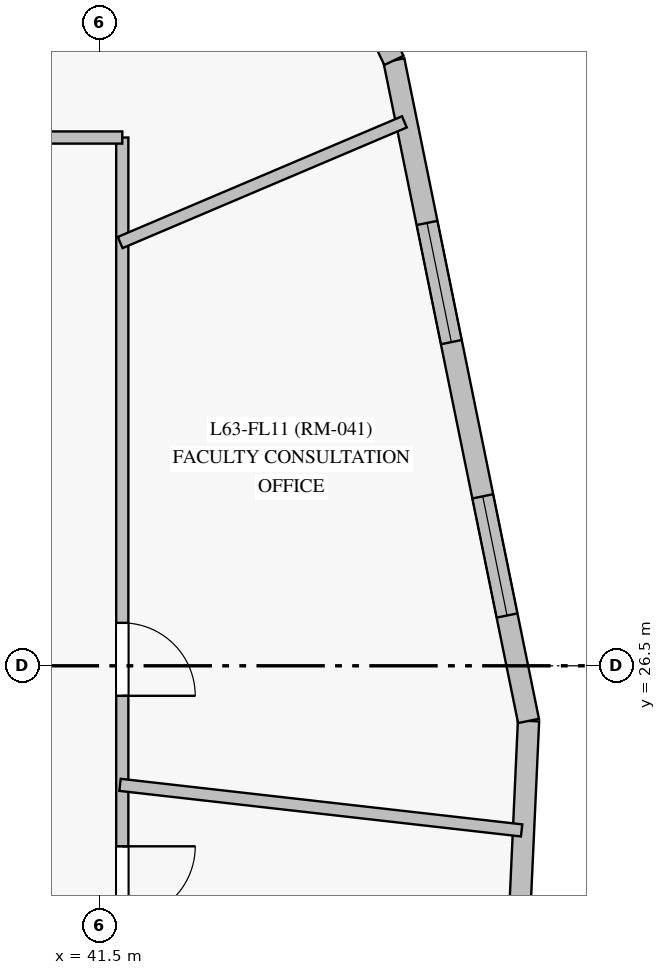
"""IFC4 building model, lengths in metres.
Left out: names, types, materials, properties, quantities, classifications, styles, units other than length and angle.
Written with IfcOpenShell. Run it as: python <this file> out.ifc"""

import sys

from ifc_helpers import new_model, si_unit, direction, frame, frame_2d, origin, origin_with_axes, place, context, subcontext, project, spatial, rectangle, extrude, source, transform, mapped, element, fill, save


model = new_model("IFC4")
c1 = context("Model", 3, precision=1e-05, world=origin(), true_north=direction((0.0, 1.0)))
c2 = subcontext(c1, "Body", "Model", "MODEL_VIEW")
j1 = project(units=[si_unit("LENGTHUNIT", "METRE"), si_unit("PLANEANGLEUNIT", "RADIAN")], contexts=[c1])
p1 = place(None, origin())
s1 = spatial("IfcSite", under=j1, at=p1, CompositionType="ELEMENT")
p2 = place(p1, origin())
s2 = spatial("IfcBuilding", under=s1, at=p2, CompositionType="ELEMENT")
p3 = place(p2, frame((0.0, 0.0, 216.9)))
s3 = spatial("IfcBuildingStorey", under=s2, at=p3, CompositionType="ELEMENT", Elevation=216.9)
p4 = place(p3, frame((46.555, 12.914, 0.0), z_axis=(0.0, 0.0, 1.0), x_axis=(0.045779275431, 0.998951579378, 0.0)))
e1 = element("IfcWall", 1, at=p4, inside=s3, PredefinedType="SOLIDWALL", context=c2, shape_type="SweptSolid", body=[
    extrude(rectangle(XDim=12.874, YDim=0.28, at=frame_2d((6.437, 0.0))), origin(), (0.0, 0.0, 1.0), 2.85),
])
p5 = place(p4, frame((2.67, 0.0, 0.85)))
e2 = element("IfcOpeningElement", 2, at=p5, cuts=e1, PredefinedType="OPENING", context=c2, shape_type="SweptSolid", body=[
    extrude(rectangle(XDim=1.6, YDim=1.6, at=frame_2d((0.8, 0.8))), frame((0.0, 0.15, 0.0), z_axis=(0.0, -1.0, 0.0), x_axis=(1.0, 0.0, 0.0)), (0.0, 0.0, 1.0), 0.3),
])
p6 = place(p4, frame((8.357, 0.0, 0.85)))
e3 = element("IfcOpeningElement", 3, at=p6, cuts=e1, PredefinedType="OPENING", context=c2, shape_type="SweptSolid", body=[
    extrude(rectangle(XDim=1.6, YDim=1.6, at=frame_2d((0.8, 0.8))), frame((0.0, 0.15, 0.0), z_axis=(0.0, -1.0, 0.0), x_axis=(1.0, 0.0, 0.0)), (0.0, 0.0, 1.0), 0.3),
])
p7 = place(p3, frame((47.145, 25.775, 0.0), z_axis=(0.0, 0.0, 1.0), x_axis=(-0.199719997546, 0.979853010701, 0.0)))
e4 = element("IfcWall", 4, at=p7, inside=s3, PredefinedType="SOLIDWALL", context=c2, shape_type="SweptSolid", body=[
    extrude(rectangle(XDim=8.869, YDim=0.28, at=frame_2d((4.434, 0.0))), origin(), (0.0, 0.0, 1.0), 2.85),
])
p8 = place(p7, frame((1.415, 0.0, 0.85)))
e5 = element("IfcOpeningElement", 5, at=p8, cuts=e4, PredefinedType="OPENING", context=c2, shape_type="SweptSolid", body=[
    extrude(rectangle(XDim=1.6, YDim=1.6, at=frame_2d((0.8, 0.8))), frame((0.0, 0.15, 0.0), z_axis=(0.0, -1.0, 0.0), x_axis=(1.0, 0.0, 0.0)), (0.0, 0.0, 1.0), 0.3),
])
p9 = place(p7, frame((5.086, 0.0, 0.85)))
e6 = element("IfcOpeningElement", 6, at=p9, cuts=e4, PredefinedType="OPENING", context=c2, shape_type="SweptSolid", body=[
    extrude(rectangle(XDim=1.6, YDim=1.6, at=frame_2d((0.8, 0.8))), frame((0.0, 0.15, 0.0), z_axis=(0.0, -1.0, 0.0), x_axis=(1.0, 0.0, 0.0)), (0.0, 0.0, 1.0), 0.3),
])
p10 = place(p3, frame((45.374, 34.465, 0.0), z_axis=(0.0, 0.0, 1.0), x_axis=(-0.433079365024, 0.901355791899, 0.0)))
e7 = element("IfcWall", 7, at=p10, inside=s3, PredefinedType="SOLIDWALL", context=c2, shape_type="SweptSolid", body=[
    extrude(rectangle(XDim=12.874, YDim=0.28, at=frame_2d((6.437, 0.0))), origin(), (0.0, 0.0, 1.0), 2.85),
])
p11 = place(p10, frame((1.599, 0.0, 0.85)))
e8 = element("IfcOpeningElement", 8, at=p11, cuts=e7, PredefinedType="OPENING", context=c2, shape_type="SweptSolid", body=[
    extrude(rectangle(XDim=1.6, YDim=1.6, at=frame_2d((0.8, 0.8))), frame((0.0, 0.15, 0.0), z_axis=(0.0, -1.0, 0.0), x_axis=(1.0, 0.0, 0.0)), (0.0, 0.0, 1.0), 0.3),
])
p12 = place(p10, frame((5.637, 0.0, 0.85)))
e9 = element("IfcOpeningElement", 9, at=p12, cuts=e7, PredefinedType="OPENING", context=c2, shape_type="SweptSolid", body=[
    extrude(rectangle(XDim=1.6, YDim=1.6, at=frame_2d((0.8, 0.8))), frame((0.0, 0.15, 0.0), z_axis=(0.0, -1.0, 0.0), x_axis=(1.0, 0.0, 0.0)), (0.0, 0.0, 1.0), 0.3),
])
p13 = place(p10, frame((9.675, 0.0, 0.85)))
e10 = element("IfcOpeningElement", 10, at=p13, cuts=e7, PredefinedType="OPENING", context=c2, shape_type="SweptSolid", body=[
    extrude(rectangle(XDim=1.6, YDim=1.6, at=frame_2d((0.8, 0.8))), frame((0.0, 0.15, 0.0), z_axis=(0.0, -1.0, 0.0), x_axis=(1.0, 0.0, 0.0)), (0.0, 0.0, 1.0), 0.3),
])
p14 = place(p3, frame((41.8, 33.45, 0.0), z_axis=(0.0, 0.0, 1.0), x_axis=(0.0, -1.0, 0.0)))
e11 = element("IfcWall", 11, at=p14, inside=s3, PredefinedType="PARTITIONING", context=c2, shape_type="SweptSolid", body=[
    extrude(rectangle(XDim=19.6, YDim=0.16, at=frame_2d((9.8, 0.0))), origin(), (0.0, 0.0, 1.0), 2.3),
])
p15 = place(p14, frame((15.3, 0.0, 0.0)))
e12 = element("IfcOpeningElement", 12, at=p15, cuts=e11, PredefinedType="OPENING", context=c2, shape_type="SweptSolid", body=[
    extrude(rectangle(XDim=0.96, YDim=2.15, at=frame_2d((0.48, 1.075))), frame((0.0, 0.09, 0.0), z_axis=(0.0, -1.0, 0.0), x_axis=(1.0, 0.0, 0.0)), (0.0, 0.0, 1.0), 0.18),
])
p16 = place(p14, frame((9.325, 0.0, 0.0)))
e13 = element("IfcOpeningElement", 13, at=p16, cuts=e11, PredefinedType="OPENING", context=c2, shape_type="SweptSolid", body=[
    extrude(rectangle(XDim=0.96, YDim=2.15, at=frame_2d((0.48, 1.075))), frame((0.0, 0.09, 0.0), z_axis=(0.0, -1.0, 0.0), x_axis=(1.0, 0.0, 0.0)), (0.0, 0.0, 1.0), 0.18),
])
p17 = place(p14, frame((6.385, 0.0, 0.0)))
e14 = element("IfcOpeningElement", 14, at=p17, cuts=e11, PredefinedType="OPENING", context=c2, shape_type="SweptSolid", body=[
    extrude(rectangle(XDim=0.96, YDim=2.15, at=frame_2d((0.48, 1.075))), frame((0.0, 0.09, 0.0), z_axis=(0.0, -1.0, 0.0), x_axis=(1.0, 0.0, 0.0)), (0.0, 0.0, 1.0), 0.18),
])
p18 = place(p3, frame((41.77, 24.934, 0.0), z_axis=(0.0, 0.0, 1.0), x_axis=(0.993626894102, -0.112719099165, 0.0)))
e15 = element("IfcWall", 15, at=p18, inside=s3, PredefinedType="PARTITIONING", context=c2, shape_type="SweptSolid", body=[
    extrude(rectangle(XDim=5.317, YDim=0.16, at=frame_2d((2.659, 0.0))), origin(), (0.0, 0.0, 1.0), 2.85),
])
p19 = place(p3, frame((37.682, 33.45, 0.0), z_axis=(0.0, 0.0, 1.0), x_axis=(1.0, 0.0, 0.0)))
e16 = element("IfcWall", 16, at=p19, inside=s3, PredefinedType="PARTITIONING", context=c2, shape_type="SweptSolid", body=[
    extrude(rectangle(XDim=4.118, YDim=0.16, at=frame_2d((2.059, 0.0))), origin(), (0.0, 0.0, 1.0), 2.85),
])
p20 = place(p3, frame((41.772, 32.069, 0.0), z_axis=(0.0, 0.0, 1.0), x_axis=(0.920510393372, 0.390718076999, 0.0)))
e17 = element("IfcWall", 17, at=p20, inside=s3, PredefinedType="PARTITIONING", context=c2, shape_type="SweptSolid", body=[
    extrude(rectangle(XDim=4.062, YDim=0.16, at=frame_2d((2.031, 0.0))), origin(), (0.0, 0.0, 1.0), 2.85),
])
m1 = source(origin_with_axes(), c2, "Body", "SweptSolid", [
    extrude(rectangle(XDim=1.6, YDim=1.6, at=frame_2d((0.8, 0.8))), frame((0.0, 0.03, 0.0), z_axis=(0.0, -1.0, 0.0), x_axis=(1.0, 0.0, 0.0)), (0.0, 0.0, 1.0), 0.06),
])
p21 = place(p8, origin())
e18 = element("IfcWindow", 18, at=p21, inside=s3, PartitioningType="SINGLE_PANEL", PredefinedType="WINDOW", context=c2, shape_type="MappedRepresentation", body=[
    mapped(m1, transform((0.0, 0.0, 0.0), scale=1.0)),
])
fill(e5, e18)
p22 = place(p9, origin())
e19 = element("IfcWindow", 19, at=p22, inside=s3, PartitioningType="SINGLE_PANEL", PredefinedType="WINDOW", context=c2, shape_type="MappedRepresentation", body=[
    mapped(m1, transform((0.0, 0.0, 0.0), scale=1.0)),
])
fill(e6, e19)
m2 = source(origin_with_axes(), c2, "Body", "SweptSolid", [
    extrude(rectangle(XDim=0.96, YDim=2.15, at=frame_2d((0.48, 1.075))), frame((0.0, 0.025, 0.0), z_axis=(0.0, -1.0, 0.0), x_axis=(1.0, 0.0, 0.0)), (0.0, 0.0, 1.0), 0.05),
])
p23 = place(p16, origin())
e20 = element("IfcDoor", 20, at=p23, inside=s3, OperationType="SINGLE_SWING_LEFT", PredefinedType="DOOR", context=c2, shape_type="MappedRepresentation", body=[
    mapped(m2, transform((0.0, 0.0, 0.0), scale=1.0)),
])
fill(e13, e20)
p24 = place(p17, origin())
e21 = element("IfcDoor", 21, at=p24, inside=s3, OperationType="SINGLE_SWING_RIGHT", PredefinedType="DOOR", context=c2, shape_type="MappedRepresentation", body=[
    mapped(m2, transform((0.0, 0.0, 0.0), scale=1.0)),
])
fill(e14, e21)
save(model, sys.argv[1])
